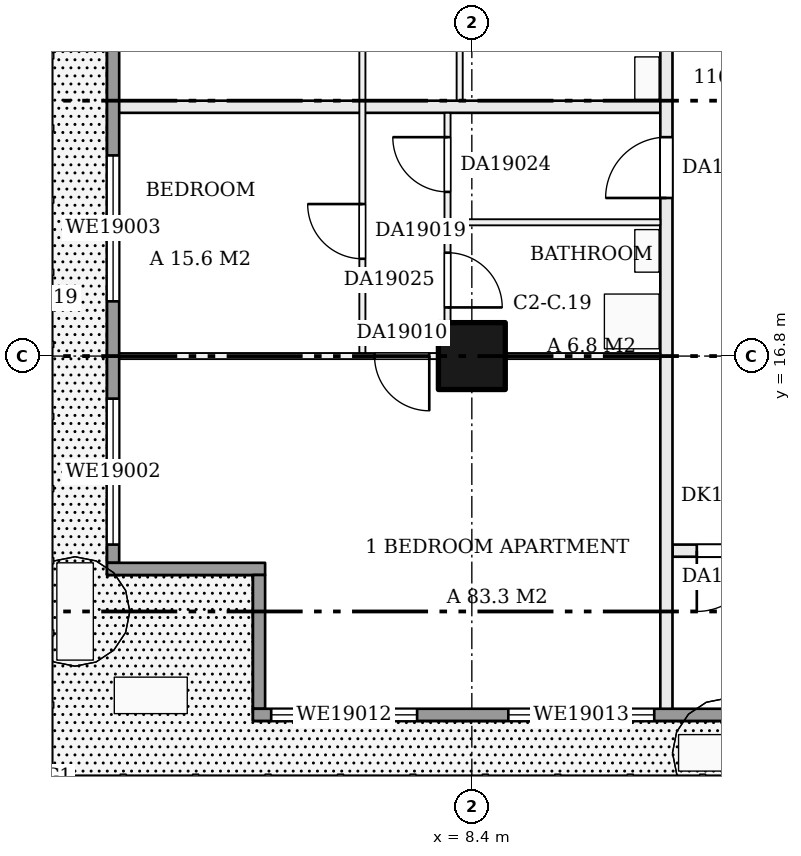
"""IFC4 building model, lengths in metres.
Left out: names, types, materials, properties, quantities, classifications, styles, units other than length and angle.
Written with IfcOpenShell. Run it as: python <this file> out.ifc"""

import sys

from ifc_helpers import new_model, si_unit, direction, frame, frame_2d, origin, origin_2d, place, context, subcontext, project, spatial, rectangle, extrude, element, fill, save


model = new_model("IFC4")
c1 = context("Model", 3, precision=1e-05, world=origin(), true_north=direction((0.0, 1.0)))
c2 = subcontext(c1, "Body", "Model", "MODEL_VIEW")
j1 = project(units=[si_unit("LENGTHUNIT", "METRE"), si_unit("PLANEANGLEUNIT", "RADIAN")], contexts=[c1])
p1 = place(None, origin())
s1 = spatial("IfcSite", under=j1, at=p1, CompositionType="ELEMENT")
p2 = place(p1, origin())
s2 = spatial("IfcBuilding", under=s1, at=p2, CompositionType="ELEMENT")
p3 = place(p2, frame((0.0, 0.0, 81.2)))
s3 = spatial("IfcBuildingStorey", under=s2, at=p3, CompositionType="ELEMENT", Elevation=81.2)
p4 = place(p3, frame((8.4, 16.8, 0.0), z_axis=(0.0, 0.0, 1.0), x_axis=(1.0, 0.0, 0.0)))
e1 = element("IfcColumn", 1, at=p4, inside=s3, PredefinedType="COLUMN", context=c2, shape_type="SweptSolid", body=[
    extrude(rectangle(XDim=1.1, YDim=1.1, at=origin_2d()), origin(), (0.0, 0.0, 1.0), 3.22),
])
p5 = place(p3, frame((11.7, 13.6, 0.0), z_axis=(0.0, 0.0, 1.0), x_axis=(1.0, 0.0, 0.0)))
e2 = element("IfcWall", 2, at=p5, inside=s3, PredefinedType="PARTITIONING", context=c2, shape_type="SweptSolid", body=[
    extrude(rectangle(XDim=1.8, YDim=0.2, at=frame_2d((0.9, 0.0))), origin(), (0.0, 0.0, 1.0), 3.22),
])
p6 = place(p5, frame((0.4, 0.0, 0.0)))
e3 = element("IfcOpeningElement", 3, at=p6, cuts=e2, PredefinedType="OPENING", context=c2, shape_type="SweptSolid", body=[
    extrude(rectangle(XDim=1.0, YDim=2.1, at=frame_2d((0.5, 1.05))), frame((0.0, 0.11, 0.0), z_axis=(0.0, -1.0, 0.0), x_axis=(1.0, 0.0, 0.0)), (0.0, 0.0, 1.0), 0.22),
])
p7 = place(p3, frame((2.5, 16.8, 0.0), z_axis=(0.0, 0.0, 1.0), x_axis=(1.0, 0.0, 0.0)))
e4 = element("IfcWall", 4, at=p7, inside=s3, PredefinedType="PARTITIONING", context=c2, shape_type="SweptSolid", body=[
    extrude(rectangle(XDim=9.0, YDim=0.1, at=frame_2d((4.5, 0.0))), origin(), (0.0, 0.0, 1.0), 3.22),
])
p8 = place(p7, frame((4.3, 0.0, 0.0)))
e5 = element("IfcOpeningElement", 5, at=p8, cuts=e4, PredefinedType="OPENING", context=c2, shape_type="SweptSolid", body=[
    extrude(rectangle(XDim=0.9, YDim=2.1, at=frame_2d((0.45, 1.05))), frame((0.0, 0.06, 0.0), z_axis=(0.0, -1.0, 0.0), x_axis=(1.0, 0.0, 0.0)), (0.0, 0.0, 1.0), 0.12),
])
p9 = place(p3, frame((8.05, 19.0, 0.0), z_axis=(0.0, 0.0, 1.0), x_axis=(1.0, 0.0, 0.0)))
e6 = element("IfcWall", 6, at=p9, inside=s3, PredefinedType="PARTITIONING", context=c2, shape_type="SweptSolid", body=[
    extrude(rectangle(XDim=3.45, YDim=0.1, at=frame_2d((1.725, 0.0))), origin(), (0.0, 0.0, 1.0), 3.22),
])
p10 = place(p3, frame((2.5, 20.9, 0.0), z_axis=(0.0, 0.0, 1.0), x_axis=(1.0, 0.0, 0.0)))
e7 = element("IfcWall", 7, at=p10, inside=s3, PredefinedType="PARTITIONING", context=c2, shape_type="SweptSolid", body=[
    extrude(rectangle(XDim=9.0, YDim=0.2, at=frame_2d((4.5, 0.0))), origin(), (0.0, 0.0, 1.0), 3.22),
])
p11 = place(p3, frame((6.6, 16.85, 0.0), z_axis=(0.0, 0.0, 1.0), x_axis=(0.0, 1.0, 0.0)))
e8 = element("IfcWall", 8, at=p11, inside=s3, PredefinedType="PARTITIONING", context=c2, shape_type="SweptSolid", body=[
    extrude(rectangle(XDim=25.05, YDim=0.1, at=frame_2d((12.525, 0.0))), origin(), (0.0, 0.0, 1.0), 3.22),
])
p12 = place(p11, frame((1.55, 0.0, 0.0)))
e9 = element("IfcOpeningElement", 9, at=p12, cuts=e8, PredefinedType="OPENING", context=c2, shape_type="SweptSolid", body=[
    extrude(rectangle(XDim=0.9, YDim=2.1, at=frame_2d((0.45, 1.05))), frame((0.0, 0.06, 0.0), z_axis=(0.0, -1.0, 0.0), x_axis=(1.0, 0.0, 0.0)), (0.0, 0.0, 1.0), 0.12),
])
p13 = place(p11, frame((5.75, 0.0, 0.0)))
e10 = element("IfcOpeningElement", 10, at=p13, cuts=e8, PredefinedType="OPENING", context=c2, shape_type="SweptSolid", body=[
    extrude(rectangle(XDim=0.9, YDim=2.1, at=frame_2d((0.45, 1.05))), frame((0.0, 0.06, 0.0), z_axis=(0.0, -1.0, 0.0), x_axis=(1.0, 0.0, 0.0)), (0.0, 0.0, 1.0), 0.12),
])
p14 = place(p11, frame((9.95, 0.0, 0.0)))
e11 = element("IfcOpeningElement", 11, at=p14, cuts=e8, PredefinedType="OPENING", context=c2, shape_type="SweptSolid", body=[
    extrude(rectangle(XDim=0.9, YDim=2.1, at=frame_2d((0.45, 1.05))), frame((0.0, 0.06, 0.0), z_axis=(0.0, -1.0, 0.0), x_axis=(1.0, 0.0, 0.0)), (0.0, 0.0, 1.0), 0.12),
])
p15 = place(p11, frame((14.15, 0.0, 0.0)))
e12 = element("IfcOpeningElement", 12, at=p15, cuts=e8, PredefinedType="OPENING", context=c2, shape_type="SweptSolid", body=[
    extrude(rectangle(XDim=0.9, YDim=2.1, at=frame_2d((0.45, 1.05))), frame((0.0, 0.06, 0.0), z_axis=(0.0, -1.0, 0.0), x_axis=(1.0, 0.0, 0.0)), (0.0, 0.0, 1.0), 0.12),
])
p16 = place(p11, frame((20.45, 0.0, 0.0)))
e13 = element("IfcOpeningElement", 13, at=p16, cuts=e8, PredefinedType="OPENING", context=c2, shape_type="SweptSolid", body=[
    extrude(rectangle(XDim=0.9, YDim=2.1, at=frame_2d((0.45, 1.05))), frame((0.0, 0.06, 0.0), z_axis=(0.0, -1.0, 0.0), x_axis=(1.0, 0.0, 0.0)), (0.0, 0.0, 1.0), 0.12),
])
p17 = place(p3, frame((8.0, 16.85, 0.0), z_axis=(0.0, 0.0, 1.0), x_axis=(0.0, 1.0, 0.0)))
e14 = element("IfcWall", 14, at=p17, inside=s3, PredefinedType="PARTITIONING", context=c2, shape_type="SweptSolid", body=[
    extrude(rectangle(XDim=3.95, YDim=0.1, at=frame_2d((1.975, 0.0))), origin(), (0.0, 0.0, 1.0), 3.22),
])
p18 = place(p17, frame((2.65, 0.0, 0.0)))
e15 = element("IfcOpeningElement", 15, at=p18, cuts=e14, PredefinedType="OPENING", context=c2, shape_type="SweptSolid", body=[
    extrude(rectangle(XDim=0.9, YDim=2.1, at=frame_2d((0.45, 1.05))), frame((0.0, 0.06, 0.0), z_axis=(0.0, -1.0, 0.0), x_axis=(1.0, 0.0, 0.0)), (0.0, 0.0, 1.0), 0.12),
])
p19 = place(p17, frame((0.75, 0.0, 0.0)))
e16 = element("IfcOpeningElement", 16, at=p19, cuts=e14, PredefinedType="OPENING", context=c2, shape_type="SweptSolid", body=[
    extrude(rectangle(XDim=0.9, YDim=2.1, at=frame_2d((0.45, 1.05))), frame((0.0, 0.06, 0.0), z_axis=(0.0, -1.0, 0.0), x_axis=(1.0, 0.0, 0.0)), (0.0, 0.0, 1.0), 0.12),
])
p20 = place(p3, frame((8.2, 21.0, 0.0), z_axis=(0.0, 0.0, 1.0), x_axis=(0.0, 1.0, 0.0)))
e17 = element("IfcWall", 17, at=p20, inside=s3, PredefinedType="PARTITIONING", context=c2, shape_type="SweptSolid", body=[
    extrude(rectangle(XDim=20.9, YDim=0.1, at=frame_2d((10.45, 0.0))), origin(), (0.0, 0.0, 1.0), 3.22),
])
p21 = place(p20, frame((5.88, 0.0, 0.0)))
e18 = element("IfcOpeningElement", 18, at=p21, cuts=e17, PredefinedType="OPENING", context=c2, shape_type="SweptSolid", body=[
    extrude(rectangle(XDim=0.9, YDim=2.1, at=frame_2d((0.45, 1.05))), frame((0.0, 0.06, 0.0), z_axis=(0.0, -1.0, 0.0), x_axis=(1.0, 0.0, 0.0)), (0.0, 0.0, 1.0), 0.12),
])
p22 = place(p20, frame((1.6, 0.0, 0.0)))
e19 = element("IfcOpeningElement", 19, at=p22, cuts=e17, PredefinedType="OPENING", context=c2, shape_type="SweptSolid", body=[
    extrude(rectangle(XDim=0.9, YDim=2.1, at=frame_2d((0.45, 1.05))), frame((0.0, 0.06, 0.0), z_axis=(0.0, -1.0, 0.0), x_axis=(1.0, 0.0, 0.0)), (0.0, 0.0, 1.0), 0.12),
])
p23 = place(p20, frame((10.16, 0.0, 0.0)))
e20 = element("IfcOpeningElement", 20, at=p23, cuts=e17, PredefinedType="OPENING", context=c2, shape_type="SweptSolid", body=[
    extrude(rectangle(XDim=0.9, YDim=2.1, at=frame_2d((0.45, 1.05))), frame((0.0, 0.06, 0.0), z_axis=(0.0, -1.0, 0.0), x_axis=(1.0, 0.0, 0.0)), (0.0, 0.0, 1.0), 0.12),
])
p24 = place(p20, frame((14.69, 0.0, 0.0)))
e21 = element("IfcOpeningElement", 21, at=p24, cuts=e17, PredefinedType="OPENING", context=c2, shape_type="SweptSolid", body=[
    extrude(rectangle(XDim=0.9, YDim=2.1, at=frame_2d((0.45, 1.05))), frame((0.0, 0.06, 0.0), z_axis=(0.0, -1.0, 0.0), x_axis=(1.0, 0.0, 0.0)), (0.0, 0.0, 1.0), 0.12),
])
p25 = place(p20, frame((18.87, 0.0, 0.0)))
e22 = element("IfcOpeningElement", 22, at=p25, cuts=e17, PredefinedType="OPENING", context=c2, shape_type="SweptSolid", body=[
    extrude(rectangle(XDim=0.9, YDim=2.1, at=frame_2d((0.45, 1.05))), frame((0.0, 0.06, 0.0), z_axis=(0.0, -1.0, 0.0), x_axis=(1.0, 0.0, 0.0)), (0.0, 0.0, 1.0), 0.12),
])
p26 = place(p3, frame((11.6, 10.9, 0.0), z_axis=(0.0, 0.0, 1.0), x_axis=(0.0, 1.0, 0.0)))
e23 = element("IfcWall", 23, at=p26, inside=s3, PredefinedType="PARTITIONING", context=c2, shape_type="SweptSolid", body=[
    extrude(rectangle(XDim=31.1, YDim=0.2, at=frame_2d((15.55, 0.0))), origin(), (0.0, 0.0, 1.0), 3.22),
])
p27 = place(p26, frame((8.5, 0.0, 0.0)))
e24 = element("IfcOpeningElement", 24, at=p27, cuts=e23, PredefinedType="OPENING", context=c2, shape_type="SweptSolid", body=[
    extrude(rectangle(XDim=1.0, YDim=2.1, at=frame_2d((0.5, 1.05))), frame((0.0, 0.11, 0.0), z_axis=(0.0, -1.0, 0.0), x_axis=(1.0, 0.0, 0.0)), (0.0, 0.0, 1.0), 0.22),
])
p28 = place(p26, frame((15.98, 0.0, 0.0)))
e25 = element("IfcOpeningElement", 25, at=p28, cuts=e23, PredefinedType="OPENING", context=c2, shape_type="SweptSolid", body=[
    extrude(rectangle(XDim=1.0, YDim=2.1, at=frame_2d((0.5, 1.05))), frame((0.0, 0.11, 0.0), z_axis=(0.0, -1.0, 0.0), x_axis=(1.0, 0.0, 0.0)), (0.0, 0.0, 1.0), 0.22),
])
p29 = place(p3, frame((2.5, 53.8, 0.0), z_axis=(0.0, 0.0, 1.0), x_axis=(0.0, -1.0, 0.0)))
e26 = element("IfcWall", 26, at=p29, inside=s3, PredefinedType="SOLIDWALL", context=c2, shape_type="SweptSolid", body=[
    extrude(rectangle(XDim=40.4, YDim=0.2, at=frame_2d((20.2, 0.0))), origin(), (0.0, 0.0, 1.0), 3.22),
])
p30 = place(p29, frame((37.7, 0.0, 0.9)))
e27 = element("IfcOpeningElement", 27, at=p30, cuts=e26, PredefinedType="OPENING", context=c2, shape_type="SweptSolid", body=[
    extrude(rectangle(XDim=2.4, YDim=1.5, at=frame_2d((1.2, 0.75))), frame((0.0, 0.11, 0.0), z_axis=(0.0, -1.0, 0.0), x_axis=(1.0, 0.0, 0.0)), (0.0, 0.0, 1.0), 0.22),
])
p31 = place(p29, frame((33.7, 0.0, 0.9)))
e28 = element("IfcOpeningElement", 28, at=p31, cuts=e26, PredefinedType="OPENING", context=c2, shape_type="SweptSolid", body=[
    extrude(rectangle(XDim=2.4, YDim=1.5, at=frame_2d((1.2, 0.75))), frame((0.0, 0.11, 0.0), z_axis=(0.0, -1.0, 0.0), x_axis=(1.0, 0.0, 0.0)), (0.0, 0.0, 1.0), 0.22),
])
p32 = place(p29, frame((29.5, 0.0, 0.9)))
e29 = element("IfcOpeningElement", 29, at=p32, cuts=e26, PredefinedType="OPENING", context=c2, shape_type="SweptSolid", body=[
    extrude(rectangle(XDim=2.4, YDim=1.5, at=frame_2d((1.2, 0.75))), frame((0.0, 0.11, 0.0), z_axis=(0.0, -1.0, 0.0), x_axis=(1.0, 0.0, 0.0)), (0.0, 0.0, 1.0), 0.22),
])
p33 = place(p29, frame((25.3, 0.0, 0.9)))
e30 = element("IfcOpeningElement", 30, at=p33, cuts=e26, PredefinedType="OPENING", context=c2, shape_type="SweptSolid", body=[
    extrude(rectangle(XDim=2.4, YDim=1.5, at=frame_2d((1.2, 0.75))), frame((0.0, 0.11, 0.0), z_axis=(0.0, -1.0, 0.0), x_axis=(1.0, 0.0, 0.0)), (0.0, 0.0, 1.0), 0.22),
])
p34 = place(p29, frame((21.1, 0.0, 0.9)))
e31 = element("IfcOpeningElement", 31, at=p34, cuts=e26, PredefinedType="OPENING", context=c2, shape_type="SweptSolid", body=[
    extrude(rectangle(XDim=2.4, YDim=1.5, at=frame_2d((1.2, 0.75))), frame((0.0, 0.11, 0.0), z_axis=(0.0, -1.0, 0.0), x_axis=(1.0, 0.0, 0.0)), (0.0, 0.0, 1.0), 0.22),
])
p35 = place(p29, frame((16.9, 0.0, 0.0)))
e32 = element("IfcOpeningElement", 32, at=p35, cuts=e26, PredefinedType="OPENING", context=c2, shape_type="SweptSolid", body=[
    extrude(rectangle(XDim=2.4, YDim=2.2, at=frame_2d((1.2, 1.1))), frame((0.0, 0.11, 0.0), z_axis=(0.0, -1.0, 0.0), x_axis=(1.0, 0.0, 0.0)), (0.0, 0.0, 1.0), 0.22),
])
p36 = place(p29, frame((12.7, 0.0, 0.0)))
e33 = element("IfcOpeningElement", 33, at=p36, cuts=e26, PredefinedType="OPENING", context=c2, shape_type="SweptSolid", body=[
    extrude(rectangle(XDim=2.4, YDim=2.2, at=frame_2d((1.2, 1.1))), frame((0.0, 0.11, 0.0), z_axis=(0.0, -1.0, 0.0), x_axis=(1.0, 0.0, 0.0)), (0.0, 0.0, 1.0), 0.22),
])
p37 = place(p29, frame((8.5, 0.0, 0.9)))
e34 = element("IfcOpeningElement", 34, at=p37, cuts=e26, PredefinedType="OPENING", context=c2, shape_type="SweptSolid", body=[
    extrude(rectangle(XDim=2.4, YDim=1.5, at=frame_2d((1.2, 0.75))), frame((0.0, 0.11, 0.0), z_axis=(0.0, -1.0, 0.0), x_axis=(1.0, 0.0, 0.0)), (0.0, 0.0, 1.0), 0.22),
])
p38 = place(p29, frame((4.3, 0.0, 0.9)))
e35 = element("IfcOpeningElement", 35, at=p38, cuts=e26, PredefinedType="OPENING", context=c2, shape_type="SweptSolid", body=[
    extrude(rectangle(XDim=2.4, YDim=1.5, at=frame_2d((1.2, 0.75))), frame((0.0, 0.11, 0.0), z_axis=(0.0, -1.0, 0.0), x_axis=(1.0, 0.0, 0.0)), (0.0, 0.0, 1.0), 0.22),
])
p39 = place(p29, frame((0.3, 0.0, 0.0)))
e36 = element("IfcOpeningElement", 36, at=p39, cuts=e26, PredefinedType="OPENING", context=c2, shape_type="SweptSolid", body=[
    extrude(rectangle(XDim=2.4, YDim=2.2, at=frame_2d((1.2, 1.1))), frame((0.0, 0.11, 0.0), z_axis=(0.0, -1.0, 0.0), x_axis=(1.0, 0.0, 0.0)), (0.0, 0.0, 1.0), 0.22),
])
p40 = place(p3, frame((2.4, 13.3, 0.0), z_axis=(0.0, 0.0, 1.0), x_axis=(1.0, 0.0, 0.0)))
e37 = element("IfcWall", 37, at=p40, inside=s3, PredefinedType="SOLIDWALL", context=c2, shape_type="SweptSolid", body=[
    extrude(rectangle(XDim=2.6, YDim=0.2, at=frame_2d((1.3, 0.0))), origin(), (0.0, 0.0, 1.0), 3.22),
])
p41 = place(p3, frame((4.9, 13.2, 0.0), z_axis=(0.0, 0.0, 1.0), x_axis=(0.0, -1.0, 0.0)))
e38 = element("IfcWall", 38, at=p41, inside=s3, PredefinedType="SOLIDWALL", context=c2, shape_type="SweptSolid", body=[
    extrude(rectangle(XDim=2.2, YDim=0.2, at=frame_2d((1.1, 0.0))), origin(), (0.0, 0.0, 1.0), 3.22),
])
p42 = place(p3, frame((4.8, 10.9, 0.0), z_axis=(0.0, 0.0, 1.0), x_axis=(1.0, 0.0, 0.0)))
e39 = element("IfcWall", 39, at=p42, inside=s3, PredefinedType="SOLIDWALL", context=c2, shape_type="SweptSolid", body=[
    extrude(rectangle(XDim=37.2, YDim=0.2, at=frame_2d((18.6, 0.0))), origin(), (0.0, 0.0, 1.0), 3.22),
])
p43 = place(p42, frame((0.3, 0.0, 0.9)))
e40 = element("IfcOpeningElement", 40, at=p43, cuts=e39, PredefinedType="OPENING", context=c2, shape_type="SweptSolid", body=[
    extrude(rectangle(XDim=2.4, YDim=1.5, at=frame_2d((1.2, 0.75))), frame((0.0, 0.11, 0.0), z_axis=(0.0, -1.0, 0.0), x_axis=(1.0, 0.0, 0.0)), (0.0, 0.0, 1.0), 0.22),
])
p44 = place(p42, frame((4.2, 0.0, 0.9)))
e41 = element("IfcOpeningElement", 41, at=p44, cuts=e39, PredefinedType="OPENING", context=c2, shape_type="SweptSolid", body=[
    extrude(rectangle(XDim=2.4, YDim=1.5, at=frame_2d((1.2, 0.75))), frame((0.0, 0.11, 0.0), z_axis=(0.0, -1.0, 0.0), x_axis=(1.0, 0.0, 0.0)), (0.0, 0.0, 1.0), 0.22),
])
p45 = place(p42, frame((12.9, 0.0, 0.9)))
e42 = element("IfcOpeningElement", 42, at=p45, cuts=e39, PredefinedType="OPENING", context=c2, shape_type="SweptSolid", body=[
    extrude(rectangle(XDim=2.4, YDim=1.5, at=frame_2d((1.2, 0.75))), frame((0.0, 0.11, 0.0), z_axis=(0.0, -1.0, 0.0), x_axis=(1.0, 0.0, 0.0)), (0.0, 0.0, 1.0), 0.22),
])
p46 = place(p42, frame((17.1, 0.0, 0.0)))
e43 = element("IfcOpeningElement", 43, at=p46, cuts=e39, PredefinedType="OPENING", context=c2, shape_type="SweptSolid", body=[
    extrude(rectangle(XDim=2.4, YDim=2.2, at=frame_2d((1.2, 1.1))), frame((0.0, 0.11, 0.0), z_axis=(0.0, -1.0, 0.0), x_axis=(1.0, 0.0, 0.0)), (0.0, 0.0, 1.0), 0.22),
])
p47 = place(p42, frame((21.3, 0.0, 0.0)))
e44 = element("IfcOpeningElement", 44, at=p47, cuts=e39, PredefinedType="OPENING", context=c2, shape_type="SweptSolid", body=[
    extrude(rectangle(XDim=2.4, YDim=2.2, at=frame_2d((1.2, 1.1))), frame((0.0, 0.11, 0.0), z_axis=(0.0, -1.0, 0.0), x_axis=(1.0, 0.0, 0.0)), (0.0, 0.0, 1.0), 0.22),
])
p48 = place(p42, frame((25.5, 0.0, 0.9)))
e45 = element("IfcOpeningElement", 45, at=p48, cuts=e39, PredefinedType="OPENING", context=c2, shape_type="SweptSolid", body=[
    extrude(rectangle(XDim=2.4, YDim=1.5, at=frame_2d((1.2, 0.75))), frame((0.0, 0.11, 0.0), z_axis=(0.0, -1.0, 0.0), x_axis=(1.0, 0.0, 0.0)), (0.0, 0.0, 1.0), 0.22),
])
p49 = place(p42, frame((29.7, 0.0, 0.9)))
e46 = element("IfcOpeningElement", 46, at=p49, cuts=e39, PredefinedType="OPENING", context=c2, shape_type="SweptSolid", body=[
    extrude(rectangle(XDim=2.4, YDim=1.5, at=frame_2d((1.2, 0.75))), frame((0.0, 0.11, 0.0), z_axis=(0.0, -1.0, 0.0), x_axis=(1.0, 0.0, 0.0)), (0.0, 0.0, 1.0), 0.22),
])
p50 = place(p42, frame((33.9, 0.0, 0.9)))
e47 = element("IfcOpeningElement", 47, at=p50, cuts=e39, PredefinedType="OPENING", context=c2, shape_type="SweptSolid", body=[
    extrude(rectangle(XDim=1.3, YDim=1.5, at=frame_2d((0.65, 0.75))), frame((0.0, 0.11, 0.0), z_axis=(0.0, -1.0, 0.0), x_axis=(1.0, 0.0, 0.0)), (0.0, 0.0, 1.0), 0.22),
])
p51 = place(p6, frame((1.0, 0.0, 0.0), z_axis=(0.0, 0.0, 1.0), x_axis=(-1.0, 0.0, 0.0)))
e48 = element("IfcDoor", 48, at=p51, inside=s3, OperationType="SINGLE_SWING_RIGHT", PredefinedType="DOOR", context=c2, shape_type="SweptSolid", body=[
    extrude(rectangle(XDim=1.0, YDim=2.1, at=frame_2d((0.5, 1.05))), frame((0.0, 0.025, 0.0), z_axis=(0.0, -1.0, 0.0), x_axis=(1.0, 0.0, 0.0)), (0.0, 0.0, 1.0), 0.05),
])
fill(e3, e48)
p52 = place(p8, frame((0.9, 0.0, 0.0), z_axis=(0.0, 0.0, 1.0), x_axis=(-1.0, 0.0, 0.0)))
e49 = element("IfcDoor", 49, at=p52, inside=s3, OperationType="SINGLE_SWING_LEFT", PredefinedType="DOOR", context=c2, shape_type="SweptSolid", body=[
    extrude(rectangle(XDim=0.9, YDim=2.1, at=frame_2d((0.45, 1.05))), frame((0.0, 0.025, 0.0), z_axis=(0.0, -1.0, 0.0), x_axis=(1.0, 0.0, 0.0)), (0.0, 0.0, 1.0), 0.05),
])
fill(e5, e49)
p53 = place(p12, origin())
e50 = element("IfcDoor", 50, at=p53, inside=s3, OperationType="SINGLE_SWING_RIGHT", PredefinedType="DOOR", context=c2, shape_type="SweptSolid", body=[
    extrude(rectangle(XDim=0.9, YDim=2.1, at=frame_2d((0.45, 1.05))), frame((0.0, 0.025, 0.0), z_axis=(0.0, -1.0, 0.0), x_axis=(1.0, 0.0, 0.0)), (0.0, 0.0, 1.0), 0.05),
])
fill(e9, e50)
p54 = place(p18, origin())
e51 = element("IfcDoor", 51, at=p54, inside=s3, OperationType="SINGLE_SWING_RIGHT", PredefinedType="DOOR", context=c2, shape_type="SweptSolid", body=[
    extrude(rectangle(XDim=0.9, YDim=2.1, at=frame_2d((0.45, 1.05))), frame((0.0, 0.025, 0.0), z_axis=(0.0, -1.0, 0.0), x_axis=(1.0, 0.0, 0.0)), (0.0, 0.0, 1.0), 0.05),
])
fill(e15, e51)
p55 = place(p19, frame((0.9, 0.0, 0.0), z_axis=(0.0, 0.0, 1.0), x_axis=(-1.0, 0.0, 0.0)))
e52 = element("IfcDoor", 52, at=p55, inside=s3, OperationType="SINGLE_SWING_RIGHT", PredefinedType="DOOR", context=c2, shape_type="SweptSolid", body=[
    extrude(rectangle(XDim=0.9, YDim=2.1, at=frame_2d((0.45, 1.05))), frame((0.0, 0.025, 0.0), z_axis=(0.0, -1.0, 0.0), x_axis=(1.0, 0.0, 0.0)), (0.0, 0.0, 1.0), 0.05),
])
fill(e16, e52)
p56 = place(p27, origin())
e53 = element("IfcDoor", 53, at=p56, inside=s3, OperationType="SINGLE_SWING_LEFT", PredefinedType="DOOR", context=c2, shape_type="SweptSolid", body=[
    extrude(rectangle(XDim=1.0, YDim=2.1, at=frame_2d((0.5, 1.05))), frame((0.0, 0.025, 0.0), z_axis=(0.0, -1.0, 0.0), x_axis=(1.0, 0.0, 0.0)), (0.0, 0.0, 1.0), 0.05),
])
fill(e24, e53)
p57 = place(p30, origin())
e54 = element("IfcWindow", 54, at=p57, inside=s3, PartitioningType="SINGLE_PANEL", PredefinedType="WINDOW", context=c2, shape_type="SweptSolid", body=[
    extrude(rectangle(XDim=2.4, YDim=1.5, at=frame_2d((1.2, 0.75))), frame((0.0, 0.03, 0.0), z_axis=(0.0, -1.0, 0.0), x_axis=(1.0, 0.0, 0.0)), (0.0, 0.0, 1.0), 0.06),
])
fill(e27, e54)
p58 = place(p31, origin())
e55 = element("IfcWindow", 55, at=p58, inside=s3, PartitioningType="SINGLE_PANEL", PredefinedType="WINDOW", context=c2, shape_type="SweptSolid", body=[
    extrude(rectangle(XDim=2.4, YDim=1.5, at=frame_2d((1.2, 0.75))), frame((0.0, 0.03, 0.0), z_axis=(0.0, -1.0, 0.0), x_axis=(1.0, 0.0, 0.0)), (0.0, 0.0, 1.0), 0.06),
])
fill(e28, e55)
p59 = place(p43, origin())
e56 = element("IfcWindow", 56, at=p59, inside=s3, PartitioningType="SINGLE_PANEL", PredefinedType="WINDOW", context=c2, shape_type="SweptSolid", body=[
    extrude(rectangle(XDim=2.4, YDim=1.5, at=frame_2d((1.2, 0.75))), frame((0.0, 0.03, 0.0), z_axis=(0.0, -1.0, 0.0), x_axis=(1.0, 0.0, 0.0)), (0.0, 0.0, 1.0), 0.06),
])
fill(e40, e56)
p60 = place(p44, origin())
e57 = element("IfcWindow", 57, at=p60, inside=s3, PartitioningType="SINGLE_PANEL", PredefinedType="WINDOW", context=c2, shape_type="SweptSolid", body=[
    extrude(rectangle(XDim=2.4, YDim=1.5, at=frame_2d((1.2, 0.75))), frame((0.0, 0.03, 0.0), z_axis=(0.0, -1.0, 0.0), x_axis=(1.0, 0.0, 0.0)), (0.0, 0.0, 1.0), 0.06),
])
fill(e41, e57)
save(model, sys.argv[1])
